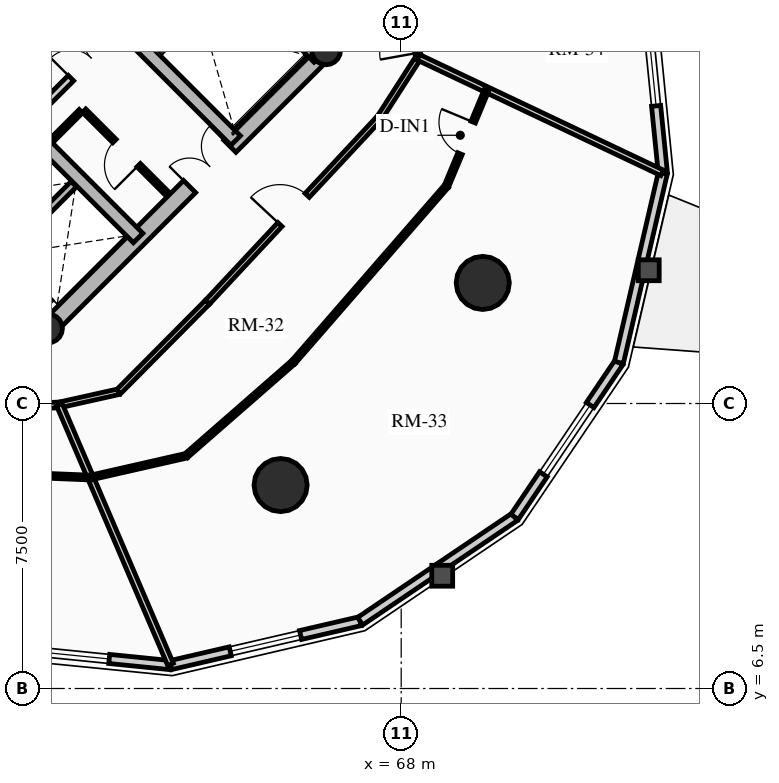
"""IFC4 building model, lengths in metres.
Left out: names, types, materials, properties, quantities, classifications, styles, units other than length and angle.
Written with IfcOpenShell. Run it as: python <this file> out.ifc"""

import sys

from ifc_helpers import new_model, si_unit, direction, frame, frame_2d, origin, origin_2d, place, context, subcontext, project, spatial, rectangle, circle, hollow_circle, extrude, source, transform, mapped, element, fill, save


model = new_model("IFC4")
c1 = context("Model", 3, precision=1e-05, world=origin(), true_north=direction((0.0, 1.0)))
c2 = subcontext(c1, "Body", "Model", "MODEL_VIEW")
j1 = project(units=[si_unit("LENGTHUNIT", "METRE"), si_unit("PLANEANGLEUNIT", "RADIAN")], contexts=[c1])
p1 = place(None, origin())
s1 = spatial("IfcSite", under=j1, at=p1, CompositionType="ELEMENT")
p2 = place(p1, origin())
s2 = spatial("IfcBuilding", under=s1, at=p2, CompositionType="ELEMENT")
p3 = place(p2, frame((0.0, 0.0, 105.07)))
s3 = spatial("IfcBuildingStorey", under=s2, at=p3, CompositionType="ELEMENT", Elevation=105.07)
for number, where, z_axis, x_axis in (
    (1, (58.737, 15.697, 0.0), (0.0, 0.0, 1.0), (-0.707, 0.707, 0.0)),
    (2, (66.303, 23.263, 0.0), (0.0, 0.0, 1.0), (-0.707, 0.707, 0.0)),
):
    element("IfcWall", number, at=place(p3, frame(where, z_axis=z_axis, x_axis=x_axis)), inside=s3, PredefinedType="SHEAR", context=c2, shape_type="SweptSolid", body=[
        extrude(rectangle(XDim=14.2, YDim=0.45, at=frame_2d((7.1, 0.0))), origin(), (0.0, 0.0, 1.0), 2.91),
    ])
p4 = place(p3, frame((58.578, 15.856, 0.0), z_axis=(0.0, 0.0, 1.0), x_axis=(0.707106781187, 0.707106781187, 0.0)))
e3 = element("IfcWall", 3, at=p4, inside=s3, PredefinedType="SHEAR", context=c2, shape_type="SweptSolid", body=[
    extrude(rectangle(XDim=10.7, YDim=0.45, at=frame_2d((5.35, 0.0))), origin(), (0.0, 0.0, 1.0), 2.91),
])
m1 = source(origin(), c2, "Body", "SweptSolid", [
    extrude(rectangle(XDim=1.5, YDim=2.02, at=frame_2d((0.75, 1.01))), frame((0.0, 0.235, 0.0), z_axis=(0.0, -1.0, 0.0), x_axis=(1.0, 0.0, 0.0)), (0.0, 0.0, 1.0), 0.47),
])
p5 = place(p4, frame((5.45, 0.0, 0.0)))
e4 = element("IfcOpeningElement", 4, at=p5, cuts=e3, PredefinedType="OPENING", context=c2, shape_type="MappedRepresentation", body=[
    mapped(m1, transform((0.0, 0.0, 0.0), x_axis=(1.0, 0.0, 0.0), y_axis=(0.0, 1.0, 0.0), z_axis=(0.0, 0.0, 1.0), scale=1.0)),
])
p6 = place(p3, frame((61.078, 18.355, 0.0), z_axis=(0.0, 0.0, 1.0), x_axis=(-0.707106781187, 0.707106781187, 0.0)))
e5 = element("IfcWall", 5, at=p6, inside=s3, PredefinedType="SHEAR", context=c2, shape_type="SweptSolid", body=[
    extrude(rectangle(XDim=13.75, YDim=0.35, at=frame_2d((6.875, 0.0))), origin(), (0.0, 0.0, 1.0), 2.91),
])
m2 = source(origin(), c2, "Body", "SweptSolid", [
    extrude(rectangle(XDim=1.1, YDim=2.015, at=frame_2d((0.55, 1.007))), frame((0.0, 0.185, 0.0), z_axis=(0.0, -1.0, 0.0), x_axis=(1.0, 0.0, 0.0)), (0.0, 0.0, 1.0), 0.37),
])
p7 = place(p6, frame((4.875, 0.0, 0.0)))
e6 = element("IfcOpeningElement", 6, at=p7, cuts=e5, PredefinedType="OPENING", context=c2, shape_type="MappedRepresentation", body=[
    mapped(m2, transform((0.0, 0.0, 0.0), x_axis=(1.0, 0.0, 0.0), y_axis=(0.0, 1.0, 0.0), z_axis=(0.0, 0.0, 1.0), scale=1.0)),
])
m3 = source(origin(), c2, "Body", "SweptSolid", [
    extrude(rectangle(XDim=1.15, YDim=2.02, at=frame_2d((0.575, 1.01))), frame((0.0, 0.185, 0.0), z_axis=(0.0, -1.0, 0.0), x_axis=(1.0, 0.0, 0.0)), (0.0, 0.0, 1.0), 0.37),
])
p8 = place(p6, frame((7.295, 0.0, 0.0)))
e7 = element("IfcOpeningElement", 7, at=p8, cuts=e5, PredefinedType="OPENING", context=c2, shape_type="MappedRepresentation", body=[
    mapped(m3, transform((0.0, 0.0, 0.0), x_axis=(1.0, 0.0, 0.0), y_axis=(0.0, 1.0, 0.0), z_axis=(0.0, 0.0, 1.0), scale=1.0)),
])
p9 = place(p3, frame((63.645, 20.922, 0.0), z_axis=(0.0, 0.0, 1.0), x_axis=(-0.707106781187, 0.707106781187, 0.0)))
e8 = element("IfcWall", 8, at=p9, inside=s3, PredefinedType="SHEAR", context=c2, shape_type="SweptSolid", body=[
    extrude(rectangle(XDim=13.75, YDim=0.35, at=frame_2d((6.875, 0.0))), origin(), (0.0, 0.0, 1.0), 2.91),
])
p10 = place(p9, frame((10.0, 0.0, 0.0)))
e9 = element("IfcOpeningElement", 9, at=p10, cuts=e8, PredefinedType="OPENING", context=c2, shape_type="MappedRepresentation", body=[
    mapped(m2, transform((0.0, 0.0, 0.0), x_axis=(1.0, 0.0, 0.0), y_axis=(0.0, 1.0, 0.0), z_axis=(0.0, 0.0, 1.0), scale=1.0)),
])
p11 = place(p9, frame((12.0, 0.0, 0.0)))
e10 = element("IfcOpeningElement", 10, at=p11, cuts=e8, PredefinedType="OPENING", context=c2, shape_type="MappedRepresentation", body=[
    mapped(m2, transform((0.0, 0.0, 0.0), x_axis=(1.0, 0.0, 0.0), y_axis=(0.0, 1.0, 0.0), z_axis=(0.0, 0.0, 1.0), scale=1.0)),
])
p12 = place(p9, frame((5.305, 0.0, 0.0)))
e11 = element("IfcOpeningElement", 11, at=p12, cuts=e8, PredefinedType="OPENING", context=c2, shape_type="MappedRepresentation", body=[
    mapped(m3, transform((0.0, 0.0, 0.0), x_axis=(1.0, 0.0, 0.0), y_axis=(0.0, 1.0, 0.0), z_axis=(0.0, 0.0, 1.0), scale=1.0)),
])
p13 = place(p3, frame((65.83, 23.107, 0.0), z_axis=(0.0, 0.0, 1.0), x_axis=(-0.707088616009, 0.707124945897, 0.0)))
e12 = element("IfcWall", 12, at=p13, inside=s3, PredefinedType="SHEAR", context=c2, shape_type="SweptSolid", body=[
    extrude(rectangle(XDim=6.72, YDim=0.35, at=frame_2d((3.36, 0.0))), origin(), (0.0, 0.0, 1.0), 2.91),
])
for number, where, z_axis, x_axis in (
    (13, (58.706, 15.976, 0.0), (0.0, 0.0, 1.0), (0.707, 0.707, 0.0)),
    (14, (66.024, 23.294, 0.0), (0.0, 0.0, 1.0), (0.707, 0.707, 0.0)),
):
    element("IfcColumn", number, at=place(p3, frame(where, z_axis=z_axis, x_axis=x_axis)), inside=s3, PredefinedType="COLUMN", context=c2, shape_type="SweptSolid", body=[
        extrude(hollow_circle(Radius=0.38, WallThickness=0.032, at=origin_2d()), origin(), (0.0, 0.0, 1.0), 2.91),
    ])
for number, where, z_axis, x_axis in (
    (15, (64.827, 11.854, 0.0), (0.0, 0.0, 1.0), (1.0, 0.0, 0.0)),
    (16, (70.146, 17.173, 0.0), (0.0, 0.0, 1.0), (1.0, 0.0, 0.0)),
):
    element("IfcColumn", number, at=place(p3, frame(where, z_axis=z_axis, x_axis=x_axis)), inside=s3, PredefinedType="USERDEFINED", context=c2, shape_type="SweptSolid", body=[
        extrude(circle(Radius=0.7, at=origin_2d()), origin(), (0.0, 0.0, 1.0), 2.91),
    ])
p14 = place(p3, frame((61.933, 7.115, 0.0), z_axis=(0.0, 0.0, 1.0), x_axis=(-0.994971754311, 0.10015591906, 0.0)))
e17 = element("IfcWall", 17, at=p14, inside=s3, PredefinedType="SOLIDWALL", context=c2, shape_type="SweptSolid", body=[
    extrude(rectangle(XDim=5.448, YDim=0.24, at=frame_2d((2.724, 0.0))), origin(), (0.0, 0.0, 1.0), 2.179),
])
m4 = source(origin(), c2, "Body", "SweptSolid", [
    extrude(rectangle(XDim=2.2, YDim=1.35, at=frame_2d((1.1, 0.675))), frame((0.0, 0.13, 0.0), z_axis=(0.0, -1.0, 0.0), x_axis=(1.0, 0.0, 0.0)), (0.0, 0.0, 1.0), 0.26),
])
p15 = place(p14, frame((1.624, 0.0, 0.65)))
e18 = element("IfcOpeningElement", 18, at=p15, cuts=e17, PredefinedType="OPENING", context=c2, shape_type="MappedRepresentation", body=[
    mapped(m4, transform((0.0, 0.0, 0.0), x_axis=(1.0, 0.0, 0.0), y_axis=(0.0, 1.0, 0.0), z_axis=(0.0, 0.0, 1.0), scale=1.0)),
])
p16 = place(p3, frame((66.92, 8.271, 0.0), z_axis=(0.0, 0.0, 1.0), x_axis=(-0.974165631126, -0.225834725257, 0.0)))
e19 = element("IfcWall", 19, at=p16, inside=s3, PredefinedType="SOLIDWALL", context=c2, shape_type="SweptSolid", body=[
    extrude(rectangle(XDim=5.119, YDim=0.24, at=frame_2d((2.56, 0.0))), origin(), (0.0, 0.0, 1.0), 2.179),
])
m5 = source(origin(), c2, "Body", "SweptSolid", [
    extrude(rectangle(XDim=1.9, YDim=1.35, at=frame_2d((0.95, 0.675))), frame((0.0, 0.13, 0.0), z_axis=(0.0, -1.0, 0.0), x_axis=(1.0, 0.0, 0.0)), (0.0, 0.0, 1.0), 0.26),
])
p17 = place(p16, frame((1.609, 0.0, 0.65)))
e20 = element("IfcOpeningElement", 20, at=p17, cuts=e19, PredefinedType="OPENING", context=c2, shape_type="MappedRepresentation", body=[
    mapped(m5, transform((0.0, 0.0, 0.0), x_axis=(1.0, 0.0, 0.0), y_axis=(0.0, 1.0, 0.0), z_axis=(0.0, 0.0, 1.0), scale=1.0)),
])
p18 = place(p3, frame((70.985, 11.015, 0.0), z_axis=(0.0, 0.0, 1.0), x_axis=(-0.828781148131, -0.559572880421, 0.0)))
e21 = element("IfcWall", 21, at=p18, inside=s3, PredefinedType="SOLIDWALL", context=c2, shape_type="SweptSolid", body=[
    extrude(rectangle(XDim=4.905, YDim=0.24, at=frame_2d((2.452, 0.0))), origin(), (0.0, 0.0, 1.0), 2.179),
])
p19 = place(p3, frame((73.729, 15.08, 0.0), z_axis=(0.0, 0.0, 1.0), x_axis=(-0.559572880421, -0.828781148131, 0.0)))
e22 = element("IfcWall", 22, at=p19, inside=s3, PredefinedType="SOLIDWALL", context=c2, shape_type="SweptSolid", body=[
    extrude(rectangle(XDim=4.905, YDim=0.24, at=frame_2d((2.452, 0.0))), origin(), (0.0, 0.0, 1.0), 2.179),
])
p20 = place(p19, frame((1.352, 0.0, 0.65)))
e23 = element("IfcOpeningElement", 23, at=p20, cuts=e22, PredefinedType="OPENING", context=c2, shape_type="MappedRepresentation", body=[
    mapped(m4, transform((0.0, 0.0, 0.0), x_axis=(1.0, 0.0, 0.0), y_axis=(0.0, 1.0, 0.0), z_axis=(0.0, 0.0, 1.0), scale=1.0)),
])
p21 = place(p3, frame((74.885, 20.067, 0.0), z_axis=(0.0, 0.0, 1.0), x_axis=(-0.225834725257, -0.974165631126, 0.0)))
e24 = element("IfcWall", 24, at=p21, inside=s3, PredefinedType="SOLIDWALL", context=c2, shape_type="SweptSolid", body=[
    extrude(rectangle(XDim=5.119, YDim=0.24, at=frame_2d((2.56, 0.0))), origin(), (0.0, 0.0, 1.0), 2.179),
])
p22 = place(p3, frame((74.339, 25.487, 0.0), z_axis=(0.0, 0.0, 1.0), x_axis=(0.10015591906, -0.994971754311, 0.0)))
e25 = element("IfcWall", 25, at=p22, inside=s3, PredefinedType="SOLIDWALL", context=c2, shape_type="SweptSolid", body=[
    extrude(rectangle(XDim=5.448, YDim=0.24, at=frame_2d((2.724, 0.0))), origin(), (0.0, 0.0, 1.0), 2.179),
])
p23 = place(p22, frame((1.774, 0.0, 0.65)))
e26 = element("IfcOpeningElement", 26, at=p23, cuts=e25, PredefinedType="OPENING", context=c2, shape_type="MappedRepresentation", body=[
    mapped(m5, transform((0.0, 0.0, 0.0), x_axis=(1.0, 0.0, 0.0), y_axis=(0.0, 1.0, 0.0), z_axis=(0.0, 0.0, 1.0), scale=1.0)),
])
p24 = place(p3, frame((57.284, 17.673, 0.0), z_axis=(0.0, 0.0, 1.0), x_axis=(0.707147878904, 0.70706568108, 0.0)))
e27 = element("IfcWall", 27, at=p24, inside=s3, PredefinedType="SHEAR", context=c2, shape_type="SweptSolid", body=[
    extrude(rectangle(XDim=2.97, YDim=0.2, at=frame_2d((1.485, 0.0))), origin(), (0.0, 0.0, 1.0), 2.91),
])
p25 = place(p3, frame((58.214, 21.467, 0.0), z_axis=(0.0, 0.0, 1.0), x_axis=(0.707106781187, 0.707106781187, 0.0)))
e28 = element("IfcWall", 28, at=p25, inside=s3, PredefinedType="PARTITIONING", context=c2, shape_type="SweptSolid", body=[
    extrude(rectangle(XDim=3.28, YDim=0.2, at=frame_2d((1.64, 0.0))), origin(), (0.0, 0.0, 1.0), 2.655),
])
m6 = source(origin(), c2, "Body", "SweptSolid", [
    extrude(rectangle(XDim=1.5, YDim=2.02, at=frame_2d((0.75, 1.01))), frame((0.0, 0.11, 0.0), z_axis=(0.0, -1.0, 0.0), x_axis=(1.0, 0.0, 0.0)), (0.0, 0.0, 1.0), 0.22),
])
p26 = place(p25, frame((1.55, 0.0, 0.0)))
e29 = element("IfcOpeningElement", 29, at=p26, cuts=e28, PredefinedType="OPENING", context=c2, shape_type="MappedRepresentation", body=[
    mapped(m6, transform((0.0, 0.0, 0.0), x_axis=(1.0, 0.0, 0.0), y_axis=(0.0, 1.0, 0.0), z_axis=(0.0, 0.0, 1.0), scale=1.0)),
])
p27 = place(p3, frame((61.835, 19.529, 0.0), z_axis=(0.0, 0.0, 1.0), x_axis=(-0.707146413884, 0.707067146267, 0.0)))
e30 = element("IfcWall", 30, at=p27, inside=s3, PredefinedType="PARTITIONING", context=c2, shape_type="SweptSolid", body=[
    extrude(rectangle(XDim=3.08, YDim=0.125, at=frame_2d((1.54, 0.0))), origin(), (0.0, 0.0, 1.0), 2.655),
])
m7 = source(origin(), c2, "Body", "SweptSolid", [
    extrude(rectangle(XDim=0.9, YDim=2.005, at=frame_2d((0.45, 1.002))), frame((0.0, 0.073, 0.0), z_axis=(0.0, -1.0, 0.0), x_axis=(1.0, 0.0, 0.0)), (0.0, 0.0, 1.0), 0.145),
])
p28 = place(p27, frame((1.05, 0.0, 0.0)))
e31 = element("IfcOpeningElement", 31, at=p28, cuts=e30, PredefinedType="OPENING", context=c2, shape_type="MappedRepresentation", body=[
    mapped(m7, transform((0.0, 0.0, 0.0), x_axis=(1.0, 0.0, 0.0), y_axis=(0.0, 1.0, 0.0), z_axis=(0.0, 0.0, 1.0), scale=1.0)),
])
p29 = place(p3, frame((58.794, 20.915, 0.0), z_axis=(0.0, 0.0, 1.0), x_axis=(0.707106781187, 0.707106781187, 0.0)))
e32 = element("IfcWall", 32, at=p29, inside=s3, PredefinedType="PARTITIONING", context=c2, shape_type="SweptSolid", body=[
    extrude(rectangle(XDim=1.1, YDim=0.125, at=frame_2d((0.55, 0.0))), origin(), (0.0, 0.0, 1.0), 2.655),
])
p30 = place(p3, frame((57.511, 13.897, 0.0), z_axis=(0.0, 0.0, 1.0), x_axis=(0.999024538494, 0.044158481476, 0.0)))
e33 = element("IfcWall", 33, at=p30, inside=s3, PredefinedType="PARTITIONING", context=c2, shape_type="SweptSolid", body=[
    extrude(rectangle(XDim=1.498, YDim=0.15, at=frame_2d((0.749, 0.0))), origin(), (0.0, 0.0, 1.0), 2.225),
])
p31 = place(p3, frame((59.008, 13.963, 0.0), z_axis=(0.0, 0.0, 1.0), x_axis=(0.976020856791, 0.21767702476, 0.0)))
e34 = element("IfcWall", 34, at=p31, inside=s3, PredefinedType="PARTITIONING", context=c2, shape_type="SweptSolid", body=[
    extrude(rectangle(XDim=1.593, YDim=0.15, at=frame_2d((0.796, 0.0))), origin(), (0.0, 0.0, 1.0), 2.225),
])
p32 = place(p3, frame((60.562, 14.31, 0.0), z_axis=(0.0, 0.0, 1.0), x_axis=(0.704566236161, 0.709638230975, 0.0)))
e35 = element("IfcWall", 35, at=p32, inside=s3, PredefinedType="PARTITIONING", context=c2, shape_type="SweptSolid", body=[
    extrude(rectangle(XDim=3.321, YDim=0.15, at=frame_2d((1.661, 0.0))), origin(), (0.0, 0.0, 1.0), 2.225),
])
p33 = place(p3, frame((62.903, 16.667, 0.0), z_axis=(0.0, 0.0, 1.0), x_axis=(0.682371947497, 0.731005147225, 0.0)))
e36 = element("IfcWall", 36, at=p33, inside=s3, PredefinedType="PARTITIONING", context=c2, shape_type="SweptSolid", body=[
    extrude(rectangle(XDim=6.642, YDim=0.15, at=frame_2d((3.321, 0.0))), origin(), (0.0, 0.0, 1.0), 2.225),
])
m8 = source(origin(), c2, "Body", "SweptSolid", [
    extrude(rectangle(XDim=1.05, YDim=2.015, at=frame_2d((0.525, 1.007))), frame((0.0, 0.085, 0.0), z_axis=(0.0, -1.0, 0.0), x_axis=(1.0, 0.0, 0.0)), (0.0, 0.0, 1.0), 0.17),
])
p34 = place(p33, frame((2.796, 0.0, 0.0)))
e37 = element("IfcOpeningElement", 37, at=p34, cuts=e36, PredefinedType="OPENING", context=c2, shape_type="MappedRepresentation", body=[
    mapped(m8, transform((0.0, 0.0, 0.0), x_axis=(1.0, 0.0, 0.0), y_axis=(0.0, 1.0, 0.0), z_axis=(0.0, 0.0, 1.0), scale=1.0)),
])
p35 = place(p3, frame((67.435, 21.521, 0.0), z_axis=(0.0, 0.0, 1.0), x_axis=(0.540777197838, 0.841165870859, 0.0)))
e38 = element("IfcWall", 38, at=p35, inside=s3, PredefinedType="PARTITIONING", context=c2, shape_type="SweptSolid", body=[
    extrude(rectangle(XDim=1.888, YDim=0.15, at=frame_2d((0.944, 0.0))), origin(), (0.0, 0.0, 1.0), 2.225),
])
p36 = place(p3, frame((68.456, 23.11, 0.0), z_axis=(0.0, 0.0, 1.0), x_axis=(-0.1772522795, 0.984165448191, 0.0)))
e39 = element("IfcWall", 39, at=p36, inside=s3, PredefinedType="PARTITIONING", context=c2, shape_type="SweptSolid", body=[
    extrude(rectangle(XDim=1.382, YDim=0.15, at=frame_2d((0.691, 0.0))), origin(), (0.0, 0.0, 1.0), 2.225),
])
m9 = source(origin(), c2, "Body", "SweptSolid", [
    extrude(rectangle(XDim=1.0, YDim=2.015, at=frame_2d((0.5, 1.007))), frame((0.0, 0.085, 0.0), z_axis=(0.0, -1.0, 0.0), x_axis=(1.0, 0.0, 0.0)), (0.0, 0.0, 1.0), 0.17),
])
p37 = place(p36, frame((0.12, 0.0, 0.0)))
e40 = element("IfcOpeningElement", 40, at=p37, cuts=e39, PredefinedType="OPENING", context=c2, shape_type="MappedRepresentation", body=[
    mapped(m9, transform((0.0, 0.0, 0.0), x_axis=(1.0, 0.0, 0.0), y_axis=(0.0, 1.0, 0.0), z_axis=(0.0, 0.0, 1.0), scale=1.0)),
])
p38 = place(p3, frame((59.008, 13.963, 0.0), z_axis=(0.0, 0.0, 1.0), x_axis=(0.393439207333, -0.919350635032, 0.0)))
e41 = element("IfcWall", 41, at=p38, inside=s3, PredefinedType="PARTITIONING", context=c2, shape_type="SweptSolid", body=[
    extrude(rectangle(XDim=7.427, YDim=0.16, at=frame_2d((3.713, 0.0))), origin(), (0.0, 0.0, 1.0), 2.179),
])
p39 = place(p3, frame((68.456, 23.11, 0.0), z_axis=(0.0, 0.0, 1.0), x_axis=(0.903539425667, -0.428504966442, 0.0)))
e42 = element("IfcWall", 42, at=p39, inside=s3, PredefinedType="PARTITIONING", context=c2, shape_type="SweptSolid", body=[
    extrude(rectangle(XDim=7.094, YDim=0.16, at=frame_2d((3.547, 0.0))), origin(), (0.0, 0.0, 1.0), 2.179),
])
p40 = place(p3, frame((57.233, 12.156, 0.0), z_axis=(0.0, 0.0, 1.0), x_axis=(0.999181916557, -0.040441286156, 0.0)))
e43 = element("IfcWall", 43, at=p40, inside=s3, PredefinedType="PARTITIONING", context=c2, shape_type="SweptSolid", body=[
    extrude(rectangle(XDim=2.596, YDim=0.125, at=frame_2d((1.298, 0.0))), origin(), (0.0, 0.0, 1.0), 2.655),
])
p41 = place(p3, frame((59.826, 12.051, 0.0), z_axis=(0.0, 0.0, 1.0), x_axis=(0.975009915085, 0.222161350116, 0.0)))
e44 = element("IfcWall", 44, at=p41, inside=s3, PredefinedType="PARTITIONING", context=c2, shape_type="SweptSolid", body=[
    extrude(rectangle(XDim=2.578, YDim=0.125, at=frame_2d((1.289, 0.0))), origin(), (0.0, 0.0, 1.0), 2.225),
])
p42 = place(p3, frame((62.34, 12.624, 0.0), z_axis=(0.0, 0.0, 1.0), x_axis=(0.753169839919, 0.657826110941, 0.0)))
e45 = element("IfcWall", 45, at=p42, inside=s3, PredefinedType="PARTITIONING", context=c2, shape_type="SweptSolid", body=[
    extrude(rectangle(XDim=3.746, YDim=0.125, at=frame_2d((1.873, 0.0))), origin(), (0.0, 0.0, 1.0), 2.225),
])
p43 = place(p3, frame((65.162, 15.088, 0.0), z_axis=(0.0, 0.0, 1.0), x_axis=(0.656379509785, 0.754430871011, 0.0)))
e46 = element("IfcWall", 46, at=p43, inside=s3, PredefinedType="PARTITIONING", context=c2, shape_type="SweptSolid", body=[
    extrude(rectangle(XDim=6.14, YDim=0.125, at=frame_2d((3.07, 0.0))), origin(), (0.0, 0.0, 1.0), 2.225),
])
p44 = place(p3, frame((69.192, 19.72, 0.0), z_axis=(0.0, 0.0, 1.0), x_axis=(0.384899070029, 0.922958669655, 0.0)))
e47 = element("IfcWall", 47, at=p44, inside=s3, PredefinedType="PARTITIONING", context=c2, shape_type="SweptSolid", body=[
    extrude(rectangle(XDim=2.75, YDim=0.125, at=frame_2d((1.375, 0.0))), origin(), (0.0, 0.0, 1.0), 2.179),
])
p45 = place(p44, frame((0.925, 0.0, 0.0)))
e48 = element("IfcOpeningElement", 48, at=p45, cuts=e47, PredefinedType="OPENING", context=c2, shape_type="MappedRepresentation", body=[
    mapped(m7, transform((0.0, 0.0, 0.0), x_axis=(1.0, 0.0, 0.0), y_axis=(0.0, 1.0, 0.0), z_axis=(0.0, 0.0, 1.0), scale=1.0)),
])
m10 = source(origin(), c2, "Body", "SweptSolid", [
    extrude(rectangle(XDim=2.2, YDim=1.35, at=frame_2d((1.1, 0.675))), frame((0.0, 0.03, 0.0), z_axis=(0.0, -1.0, 0.0), x_axis=(1.0, 0.0, 0.0)), (0.0, 0.0, 1.0), 0.06),
])
p46 = place(p15, origin())
e49 = element("IfcWindow", 49, at=p46, inside=s3, PartitioningType="DOUBLE_PANEL_VERTICAL", PredefinedType="WINDOW", context=c2, shape_type="MappedRepresentation", body=[
    mapped(m10, transform((0.0, 0.0, 0.0), x_axis=(1.0, 0.0, 0.0), y_axis=(0.0, 1.0, 0.0), z_axis=(0.0, 0.0, 1.0), scale=1.0)),
])
fill(e18, e49)
m11 = source(origin(), c2, "Body", "SweptSolid", [
    extrude(rectangle(XDim=1.9, YDim=1.35, at=frame_2d((0.95, 0.675))), frame((0.0, 0.03, 0.0), z_axis=(0.0, -1.0, 0.0), x_axis=(1.0, 0.0, 0.0)), (0.0, 0.0, 1.0), 0.06),
])
p47 = place(p17, origin())
e50 = element("IfcWindow", 50, at=p47, inside=s3, PartitioningType="DOUBLE_PANEL_VERTICAL", PredefinedType="WINDOW", context=c2, shape_type="MappedRepresentation", body=[
    mapped(m11, transform((0.0, 0.0, 0.0), x_axis=(1.0, 0.0, 0.0), y_axis=(0.0, 1.0, 0.0), z_axis=(0.0, 0.0, 1.0), scale=1.0)),
])
fill(e20, e50)
p48 = place(p20, origin())
e51 = element("IfcWindow", 51, at=p48, inside=s3, PartitioningType="DOUBLE_PANEL_VERTICAL", PredefinedType="WINDOW", context=c2, shape_type="MappedRepresentation", body=[
    mapped(m10, transform((0.0, 0.0, 0.0), x_axis=(1.0, 0.0, 0.0), y_axis=(0.0, 1.0, 0.0), z_axis=(0.0, 0.0, 1.0), scale=1.0)),
])
fill(e23, e51)
p49 = place(p23, origin())
e52 = element("IfcWindow", 52, at=p49, inside=s3, PartitioningType="DOUBLE_PANEL_VERTICAL", PredefinedType="WINDOW", context=c2, shape_type="MappedRepresentation", body=[
    mapped(m11, transform((0.0, 0.0, 0.0), x_axis=(1.0, 0.0, 0.0), y_axis=(0.0, 1.0, 0.0), z_axis=(0.0, 0.0, 1.0), scale=1.0)),
])
fill(e26, e52)
m12 = source(origin(), c2, "Body", "SweptSolid", [
    extrude(rectangle(XDim=1.5, YDim=2.02, at=frame_2d((0.75, 1.01))), frame((0.0, 0.025, 0.0), z_axis=(0.0, -1.0, 0.0), x_axis=(1.0, 0.0, 0.0)), (0.0, 0.0, 1.0), 0.05),
])
p50 = place(p5, origin())
e53 = element("IfcDoor", 53, at=p50, inside=s3, OperationType="DOUBLE_DOOR_SINGLE_SWING", PredefinedType="DOOR", context=c2, shape_type="MappedRepresentation", body=[
    mapped(m12, transform((0.0, 0.0, 0.0), x_axis=(1.0, 0.0, 0.0), y_axis=(0.0, 1.0, 0.0), z_axis=(0.0, 0.0, 1.0), scale=1.0)),
])
fill(e4, e53)
p51 = place(p26, origin())
e54 = element("IfcDoor", 54, at=p51, inside=s3, OperationType="DOUBLE_DOOR_SINGLE_SWING", PredefinedType="DOOR", context=c2, shape_type="MappedRepresentation", body=[
    mapped(m12, transform((0.0, 0.0, 0.0), x_axis=(1.0, 0.0, 0.0), y_axis=(0.0, 1.0, 0.0), z_axis=(0.0, 0.0, 1.0), scale=1.0)),
])
fill(e29, e54)
m13 = source(origin(), c2, "Body", "SweptSolid", [
    extrude(rectangle(XDim=0.9, YDim=2.005, at=frame_2d((0.45, 1.002))), frame((0.0, 0.025, 0.0), z_axis=(0.0, -1.0, 0.0), x_axis=(1.0, 0.0, 0.0)), (0.0, 0.0, 1.0), 0.05),
])
p52 = place(p28, origin())
e55 = element("IfcDoor", 55, at=p52, inside=s3, OperationType="SINGLE_SWING_LEFT", PredefinedType="DOOR", context=c2, shape_type="MappedRepresentation", body=[
    mapped(m13, transform((0.0, 0.0, 0.0), x_axis=(1.0, 0.0, 0.0), y_axis=(0.0, 1.0, 0.0), z_axis=(0.0, 0.0, 1.0), scale=1.0)),
])
fill(e31, e55)
m14 = source(origin(), c2, "Body", "SweptSolid", [
    extrude(rectangle(XDim=1.05, YDim=2.015, at=frame_2d((0.525, 1.007))), frame((0.0, 0.025, 0.0), z_axis=(0.0, -1.0, 0.0), x_axis=(1.0, 0.0, 0.0)), (0.0, 0.0, 1.0), 0.05),
])
p53 = place(p34, origin())
e56 = element("IfcDoor", 56, at=p53, inside=s3, OperationType="SINGLE_SWING_LEFT", PredefinedType="DOOR", context=c2, shape_type="MappedRepresentation", body=[
    mapped(m14, transform((0.0, 0.0, 0.0), x_axis=(1.0, 0.0, 0.0), y_axis=(0.0, 1.0, 0.0), z_axis=(0.0, 0.0, 1.0), scale=1.0)),
])
fill(e37, e56)
p54 = place(p45, origin())
e57 = element("IfcDoor", 57, at=p54, inside=s3, OperationType="SINGLE_SWING_RIGHT", PredefinedType="DOOR", context=c2, shape_type="MappedRepresentation", body=[
    mapped(m13, transform((0.0, 0.0, 0.0), x_axis=(1.0, 0.0, 0.0), y_axis=(0.0, 1.0, 0.0), z_axis=(0.0, 0.0, 1.0), scale=1.0)),
])
fill(e48, e57)
m15 = source(origin(), c2, "Body", "SweptSolid", [
    extrude(rectangle(XDim=1.0, YDim=2.015, at=frame_2d((0.5, 1.007))), frame((0.0, 0.025, 0.0), z_axis=(0.0, -1.0, 0.0), x_axis=(1.0, 0.0, 0.0)), (0.0, 0.0, 1.0), 0.05),
])
p55 = place(p37, origin())
e58 = element("IfcDoor", 58, at=p55, inside=s3, OperationType="SINGLE_SWING_LEFT", PredefinedType="DOOR", context=c2, shape_type="MappedRepresentation", body=[
    mapped(m15, transform((0.0, 0.0, 0.0), x_axis=(1.0, 0.0, 0.0), y_axis=(0.0, 1.0, 0.0), z_axis=(0.0, 0.0, 1.0), scale=1.0)),
])
fill(e40, e58)
save(model, sys.argv[1])
